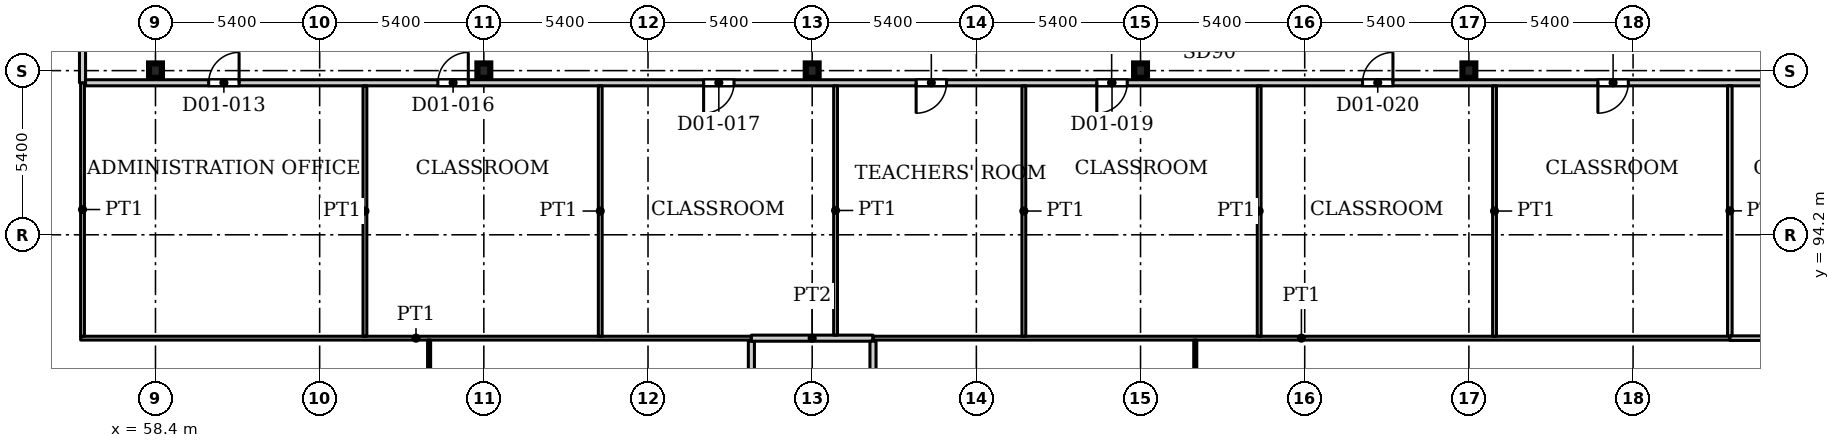
"""IFC4 building model, lengths in metres.
Left out: names, types, materials, properties, quantities, classifications, styles, units other than length and angle.
Written with IfcOpenShell. Run it as: python <this file> out.ifc"""

import sys

from ifc_helpers import new_model, si_unit, direction, frame, frame_2d, origin, origin_2d, place, context, subcontext, project, spatial, rectangle, i_section, extrude, source, transform, mapped, element, fill, save


model = new_model("IFC4")
c1 = context("Model", 3, precision=1e-05, world=origin(), true_north=direction((0.0, 1.0)))
c2 = subcontext(c1, "Body", "Model", "MODEL_VIEW")
j1 = project(units=[si_unit("LENGTHUNIT", "METRE"), si_unit("PLANEANGLEUNIT", "RADIAN")], contexts=[c1])
p1 = place(None, origin())
s1 = spatial("IfcSite", under=j1, at=p1, CompositionType="ELEMENT")
p2 = place(p1, origin())
s2 = spatial("IfcBuilding", under=s1, at=p2, CompositionType="ELEMENT")
p3 = place(p2, frame((0.0, 0.0, 7.5)))
s3 = spatial("IfcBuildingStorey", under=s2, at=p3, CompositionType="ELEMENT", Elevation=7.5)
for number, where, z_axis, x_axis in (
    (1, (58.4, 99.6, 0.0), (0.0, 0.0, 1.0), (1.0, 0.0, 0.0)),
    (2, (69.2, 99.6, 0.0), (0.0, 0.0, 1.0), (1.0, 0.0, 0.0)),
    (3, (80.0, 99.6, 0.0), (0.0, 0.0, 1.0), (1.0, 0.0, 0.0)),
    (4, (90.8, 99.6, 0.0), (0.0, 0.0, 1.0), (1.0, 0.0, 0.0)),
    (5, (101.6, 99.6, 0.0), (0.0, 0.0, 1.0), (1.0, 0.0, 0.0)),
):
    element("IfcColumn", number, at=place(p3, frame(where, z_axis=z_axis, x_axis=x_axis)), inside=s3, PredefinedType="COLUMN", context=c2, shape_type="SweptSolid", body=[
        extrude(i_section(OverallWidth=0.424, OverallDepth=0.474, WebThickness=0.048, FlangeThickness=0.077, FilletRadius=0.014, at=origin_2d()), origin(), (0.0, 0.0, 1.0), 5.0),
    ])
p4 = place(p3, frame((55.938, 90.8, 0.0), z_axis=(0.0, 0.0, 1.0), x_axis=(1.0, 0.0, 0.0)))
e6 = element("IfcWall", 6, at=p4, inside=s3, PredefinedType="PARTITIONING", context=c2, shape_type="SweptSolid", body=[
    extrude(rectangle(XDim=22.062, YDim=0.125, at=frame_2d((11.031, 0.0))), origin(), (0.0, 0.0, 1.0), 4.68),
])
p5 = place(p3, frame((56.0, 90.862, 0.0), z_axis=(0.0, 0.0, 1.0), x_axis=(0.0, 1.0, 0.0)))
e7 = element("IfcWall", 7, at=p5, inside=s3, PredefinedType="PARTITIONING", context=c2, shape_type="SweptSolid", body=[
    extrude(rectangle(XDim=8.338, YDim=0.125, at=frame_2d((4.169, 0.0))), origin(), (0.0, 0.0, 1.0), 4.68),
])
p6 = place(p3, frame((56.0, 99.2, 0.0), z_axis=(0.0, 0.0, 1.0), x_axis=(0.0, 1.0, 0.0)))
e8 = element("IfcWall", 8, at=p6, inside=s3, PredefinedType="PARTITIONING", context=c2, shape_type="SweptSolid", body=[
    extrude(rectangle(XDim=2.4, YDim=0.2, at=frame_2d((1.2, 0.0))), origin(), (0.0, 0.0, 1.0), 4.68),
])
p7 = place(p3, frame((56.1, 99.2, 0.0), z_axis=(0.0, 0.0, 1.0), x_axis=(1.0, 0.0, 0.0)))
e9 = element("IfcWall", 9, at=p7, inside=s3, PredefinedType="PARTITIONING", context=c2, shape_type="SweptSolid", body=[
    extrude(rectangle(XDim=67.5, YDim=0.2, at=frame_2d((33.75, 0.0))), origin(), (0.0, 0.0, 1.0), 4.68),
])
p8 = place(p7, frame((4.05, 0.0, 0.0)))
e10 = element("IfcOpeningElement", 10, at=p8, cuts=e9, PredefinedType="OPENING", context=c2, shape_type="SweptSolid", body=[
    extrude(rectangle(XDim=1.0, YDim=2.1, at=frame_2d((0.5, 1.05))), frame((0.0, 0.11, 0.0), z_axis=(0.0, -1.0, 0.0), x_axis=(1.0, 0.0, 0.0)), (0.0, 0.0, 1.0), 0.22),
])
p9 = place(p7, frame((65.554, 0.0, 0.0)))
e11 = element("IfcOpeningElement", 11, at=p9, cuts=e9, PredefinedType="OPENING", context=c2, shape_type="SweptSolid", body=[
    extrude(rectangle(XDim=1.0, YDim=2.1, at=frame_2d((0.5, 1.05))), frame((0.0, 0.11, 0.0), z_axis=(0.0, -1.0, 0.0), x_axis=(1.0, 0.0, 0.0)), (0.0, 0.0, 1.0), 0.22),
])
p10 = place(p7, frame((11.589, 0.0, 0.0)))
e12 = element("IfcOpeningElement", 12, at=p10, cuts=e9, PredefinedType="OPENING", context=c2, shape_type="SweptSolid", body=[
    extrude(rectangle(XDim=1.0, YDim=2.1, at=frame_2d((0.5, 1.05))), frame((0.0, 0.11, 0.0), z_axis=(0.0, -1.0, 0.0), x_axis=(1.0, 0.0, 0.0)), (0.0, 0.0, 1.0), 0.22),
])
p11 = place(p7, frame((20.329, 0.0, 0.0)))
e13 = element("IfcOpeningElement", 13, at=p11, cuts=e9, PredefinedType="OPENING", context=c2, shape_type="SweptSolid", body=[
    extrude(rectangle(XDim=1.0, YDim=2.1, at=frame_2d((0.5, 1.05))), frame((0.0, 0.11, 0.0), z_axis=(0.0, -1.0, 0.0), x_axis=(1.0, 0.0, 0.0)), (0.0, 0.0, 1.0), 0.22),
])
p12 = place(p7, frame((27.319, 0.0, 0.0)))
e14 = element("IfcOpeningElement", 14, at=p12, cuts=e9, PredefinedType="OPENING", context=c2, shape_type="SweptSolid", body=[
    extrude(rectangle(XDim=1.0, YDim=2.1, at=frame_2d((0.5, 1.05))), frame((0.0, 0.11, 0.0), z_axis=(0.0, -1.0, 0.0), x_axis=(1.0, 0.0, 0.0)), (0.0, 0.0, 1.0), 0.22),
])
p13 = place(p7, frame((33.262, 0.0, 0.0)))
e15 = element("IfcOpeningElement", 15, at=p13, cuts=e9, PredefinedType="OPENING", context=c2, shape_type="SweptSolid", body=[
    extrude(rectangle(XDim=1.0, YDim=2.1, at=frame_2d((0.5, 1.05))), frame((0.0, 0.11, 0.0), z_axis=(0.0, -1.0, 0.0), x_axis=(1.0, 0.0, 0.0)), (0.0, 0.0, 1.0), 0.22),
])
p14 = place(p7, frame((42.002, 0.0, 0.0)))
e16 = element("IfcOpeningElement", 16, at=p14, cuts=e9, PredefinedType="OPENING", context=c2, shape_type="SweptSolid", body=[
    extrude(rectangle(XDim=1.0, YDim=2.1, at=frame_2d((0.5, 1.05))), frame((0.0, 0.11, 0.0), z_axis=(0.0, -1.0, 0.0), x_axis=(1.0, 0.0, 0.0)), (0.0, 0.0, 1.0), 0.22),
])
p15 = place(p7, frame((49.743, 0.0, 0.0)))
e17 = element("IfcOpeningElement", 17, at=p15, cuts=e9, PredefinedType="OPENING", context=c2, shape_type="SweptSolid", body=[
    extrude(rectangle(XDim=1.0, YDim=2.1, at=frame_2d((0.5, 1.05))), frame((0.0, 0.11, 0.0), z_axis=(0.0, -1.0, 0.0), x_axis=(1.0, 0.0, 0.0)), (0.0, 0.0, 1.0), 0.22),
])
p16 = place(p7, frame((56.733, 0.0, 0.0)))
e18 = element("IfcOpeningElement", 18, at=p16, cuts=e9, PredefinedType="OPENING", context=c2, shape_type="SweptSolid", body=[
    extrude(rectangle(XDim=1.0, YDim=2.1, at=frame_2d((0.5, 1.05))), frame((0.0, 0.11, 0.0), z_axis=(0.0, -1.0, 0.0), x_axis=(1.0, 0.0, 0.0)), (0.0, 0.0, 1.0), 0.22),
])
p17 = place(p7, frame((61.394, 0.0, 0.0)))
e19 = element("IfcOpeningElement", 19, at=p17, cuts=e9, PredefinedType="OPENING", context=c2, shape_type="SweptSolid", body=[
    extrude(rectangle(XDim=1.0, YDim=2.1, at=frame_2d((0.5, 1.05))), frame((0.0, 0.11, 0.0), z_axis=(0.0, -1.0, 0.0), x_axis=(1.0, 0.0, 0.0)), (0.0, 0.0, 1.0), 0.22),
])
p18 = place(p3, frame((65.289, 90.862, 0.0), z_axis=(0.0, 0.0, 1.0), x_axis=(0.0, 1.0, 0.0)))
e20 = element("IfcWall", 20, at=p18, inside=s3, PredefinedType="PARTITIONING", context=c2, shape_type="SweptSolid", body=[
    extrude(rectangle(XDim=8.238, YDim=0.125, at=frame_2d((4.119, 0.0))), origin(), (0.0, 0.0, 1.0), 4.68),
])
p19 = place(p3, frame((67.4, 69.0, 0.0), z_axis=(0.0, 0.0, 1.0), x_axis=(0.0, 1.0, 0.0)))
e21 = element("IfcWall", 21, at=p19, inside=s3, PredefinedType="PARTITIONING", context=c2, shape_type="SweptSolid", body=[
    extrude(rectangle(XDim=21.738, YDim=0.1, at=frame_2d((10.869, 0.0))), origin(), (0.0, 0.0, 1.0), 4.68),
])
p20 = place(p3, frame((73.029, 90.862, 0.0), z_axis=(0.0, 0.0, 1.0), x_axis=(0.0, 1.0, 0.0)))
e22 = element("IfcWall", 22, at=p20, inside=s3, PredefinedType="PARTITIONING", context=c2, shape_type="SweptSolid", body=[
    extrude(rectangle(XDim=8.238, YDim=0.125, at=frame_2d((4.119, 0.0))), origin(), (0.0, 0.0, 1.0), 4.68),
])
p21 = place(p3, frame((78.0, 69.1, 0.0), z_axis=(0.0, 0.0, 1.0), x_axis=(0.0, 1.0, 0.0)))
e23 = element("IfcWall", 23, at=p21, inside=s3, PredefinedType="PARTITIONING", context=c2, shape_type="SweptSolid", body=[
    extrude(rectangle(XDim=21.6, YDim=0.2, at=frame_2d((10.8, 0.0))), origin(), (0.0, 0.0, 1.0), 4.68),
])
p22 = place(p3, frame((78.0, 90.8, 0.0), z_axis=(0.0, 0.0, 1.0), x_axis=(1.0, 0.0, 0.0)))
e24 = element("IfcWall", 24, at=p22, inside=s3, PredefinedType="PARTITIONING", context=c2, shape_type="SweptSolid", body=[
    extrude(rectangle(XDim=4.0, YDim=0.2, at=frame_2d((2.0, 0.0))), origin(), (0.0, 0.0, 1.0), 4.68),
])
p23 = place(p3, frame((80.769, 90.9, 0.0), z_axis=(0.0, 0.0, 1.0), x_axis=(0.0, 1.0, 0.0)))
e25 = element("IfcWall", 25, at=p23, inside=s3, PredefinedType="PARTITIONING", context=c2, shape_type="SweptSolid", body=[
    extrude(rectangle(XDim=8.2, YDim=0.125, at=frame_2d((4.1, 0.0))), origin(), (0.0, 0.0, 1.0), 4.68),
])
p24 = place(p3, frame((82.0, 69.1, 0.0), z_axis=(0.0, 0.0, 1.0), x_axis=(0.0, 1.0, 0.0)))
e26 = element("IfcWall", 26, at=p24, inside=s3, PredefinedType="PARTITIONING", context=c2, shape_type="SweptSolid", body=[
    extrude(rectangle(XDim=21.6, YDim=0.2, at=frame_2d((10.8, 0.0))), origin(), (0.0, 0.0, 1.0), 4.68),
])
p25 = place(p3, frame((82.0, 90.8, 0.0), z_axis=(0.0, 0.0, 1.0), x_axis=(1.0, 0.0, 0.0)))
e27 = element("IfcWall", 27, at=p25, inside=s3, PredefinedType="PARTITIONING", context=c2, shape_type="SweptSolid", body=[
    extrude(rectangle(XDim=28.183, YDim=0.125, at=frame_2d((14.092, 0.0))), origin(), (0.0, 0.0, 1.0), 4.68),
])
p26 = place(p3, frame((86.962, 90.862, 0.0), z_axis=(0.0, 0.0, 1.0), x_axis=(0.0, 1.0, 0.0)))
e28 = element("IfcWall", 28, at=p26, inside=s3, PredefinedType="PARTITIONING", context=c2, shape_type="SweptSolid", body=[
    extrude(rectangle(XDim=8.238, YDim=0.125, at=frame_2d((4.119, 0.0))), origin(), (0.0, 0.0, 1.0), 4.68),
])
p27 = place(p3, frame((92.6, 69.0, 0.0), z_axis=(0.0, 0.0, 1.0), x_axis=(0.0, 1.0, 0.0)))
e29 = element("IfcWall", 29, at=p27, inside=s3, PredefinedType="PARTITIONING", context=c2, shape_type="SweptSolid", body=[
    extrude(rectangle(XDim=21.738, YDim=0.1, at=frame_2d((10.869, 0.0))), origin(), (0.0, 0.0, 1.0), 4.68),
])
for number, where, z_axis, x_axis in (
    (30, (94.702, 90.862, 0.0), (0.0, 0.0, 1.0), (0.0, 1.0, 0.0)),
    (31, (102.443, 90.862, 0.0), (0.0, 0.0, 1.0), (0.0, 1.0, 0.0)),
):
    element("IfcWall", number, at=place(p3, frame(where, z_axis=z_axis, x_axis=x_axis)), inside=s3, PredefinedType="PARTITIONING", context=c2, shape_type="SweptSolid", body=[
        extrude(rectangle(XDim=8.238, YDim=0.125, at=frame_2d((4.119, 0.0))), origin(), (0.0, 0.0, 1.0), 4.68),
    ])
p28 = place(p3, frame((110.183, 90.8, 0.0), z_axis=(0.0, 0.0, 1.0), x_axis=(1.0, 0.0, 0.0)))
e32 = element("IfcWall", 32, at=p28, inside=s3, PredefinedType="PARTITIONING", context=c2, shape_type="SweptSolid", body=[
    extrude(rectangle(XDim=10.321, YDim=0.15, at=frame_2d((5.16, 0.0))), origin(), (0.0, 0.0, 1.0), 4.68),
])
p29 = place(p3, frame((110.183, 90.875, 0.0), z_axis=(0.0, 0.0, 1.0), x_axis=(0.0, 1.0, 0.0)))
e33 = element("IfcWall", 33, at=p29, inside=s3, PredefinedType="PARTITIONING", context=c2, shape_type="SweptSolid", body=[
    extrude(rectangle(XDim=8.225, YDim=0.15, at=frame_2d((4.113, 0.0))), origin(), (0.0, 0.0, 1.0), 4.68),
])
m1 = source(origin(), c2, "Body", "SweptSolid", [
    extrude(rectangle(XDim=1.0, YDim=2.1, at=frame_2d((0.5, 1.05))), frame((0.0, 0.025, 0.0), z_axis=(0.0, -1.0, 0.0), x_axis=(1.0, 0.0, 0.0)), (0.0, 0.0, 1.0), 0.05),
])
p30 = place(p8, origin())
e34 = element("IfcDoor", 34, at=p30, inside=s3, OperationType="SINGLE_SWING_LEFT", PredefinedType="DOOR", context=c2, shape_type="MappedRepresentation", body=[
    mapped(m1, transform((0.0, 0.0, 0.0), x_axis=(1.0, 0.0, 0.0), y_axis=(0.0, 1.0, 0.0), z_axis=(0.0, 0.0, 1.0), scale=1.0)),
])
fill(e10, e34)
p31 = place(p10, origin())
e35 = element("IfcDoor", 35, at=p31, inside=s3, OperationType="SINGLE_SWING_LEFT", PredefinedType="DOOR", context=c2, shape_type="MappedRepresentation", body=[
    mapped(m1, transform((0.0, 0.0, 0.0), x_axis=(1.0, 0.0, 0.0), y_axis=(0.0, 1.0, 0.0), z_axis=(0.0, 0.0, 1.0), scale=1.0)),
])
fill(e12, e35)
p32 = place(p11, origin())
e36 = element("IfcDoor", 36, at=p32, inside=s3, OperationType="SINGLE_SWING_RIGHT", PredefinedType="DOOR", context=c2, shape_type="MappedRepresentation", body=[
    mapped(m1, transform((0.0, 0.0, 0.0), x_axis=(1.0, 0.0, 0.0), y_axis=(0.0, 1.0, 0.0), z_axis=(0.0, 0.0, 1.0), scale=1.0)),
])
fill(e13, e36)
p33 = place(p12, origin())
e37 = element("IfcDoor", 37, at=p33, inside=s3, OperationType="SINGLE_SWING_RIGHT", PredefinedType="DOOR", context=c2, shape_type="MappedRepresentation", body=[
    mapped(m1, transform((0.0, 0.0, 0.0), x_axis=(1.0, 0.0, 0.0), y_axis=(0.0, 1.0, 0.0), z_axis=(0.0, 0.0, 1.0), scale=1.0)),
])
fill(e14, e37)
p34 = place(p13, origin())
e38 = element("IfcDoor", 38, at=p34, inside=s3, OperationType="SINGLE_SWING_RIGHT", PredefinedType="DOOR", context=c2, shape_type="MappedRepresentation", body=[
    mapped(m1, transform((0.0, 0.0, 0.0), x_axis=(1.0, 0.0, 0.0), y_axis=(0.0, 1.0, 0.0), z_axis=(0.0, 0.0, 1.0), scale=1.0)),
])
fill(e15, e38)
p35 = place(p14, origin())
e39 = element("IfcDoor", 39, at=p35, inside=s3, OperationType="SINGLE_SWING_LEFT", PredefinedType="DOOR", context=c2, shape_type="MappedRepresentation", body=[
    mapped(m1, transform((0.0, 0.0, 0.0), x_axis=(1.0, 0.0, 0.0), y_axis=(0.0, 1.0, 0.0), z_axis=(0.0, 0.0, 1.0), scale=1.0)),
])
fill(e16, e39)
p36 = place(p15, origin())
e40 = element("IfcDoor", 40, at=p36, inside=s3, OperationType="SINGLE_SWING_RIGHT", PredefinedType="DOOR", context=c2, shape_type="MappedRepresentation", body=[
    mapped(m1, transform((0.0, 0.0, 0.0), x_axis=(1.0, 0.0, 0.0), y_axis=(0.0, 1.0, 0.0), z_axis=(0.0, 0.0, 1.0), scale=1.0)),
])
fill(e17, e40)
save(model, sys.argv[1])
